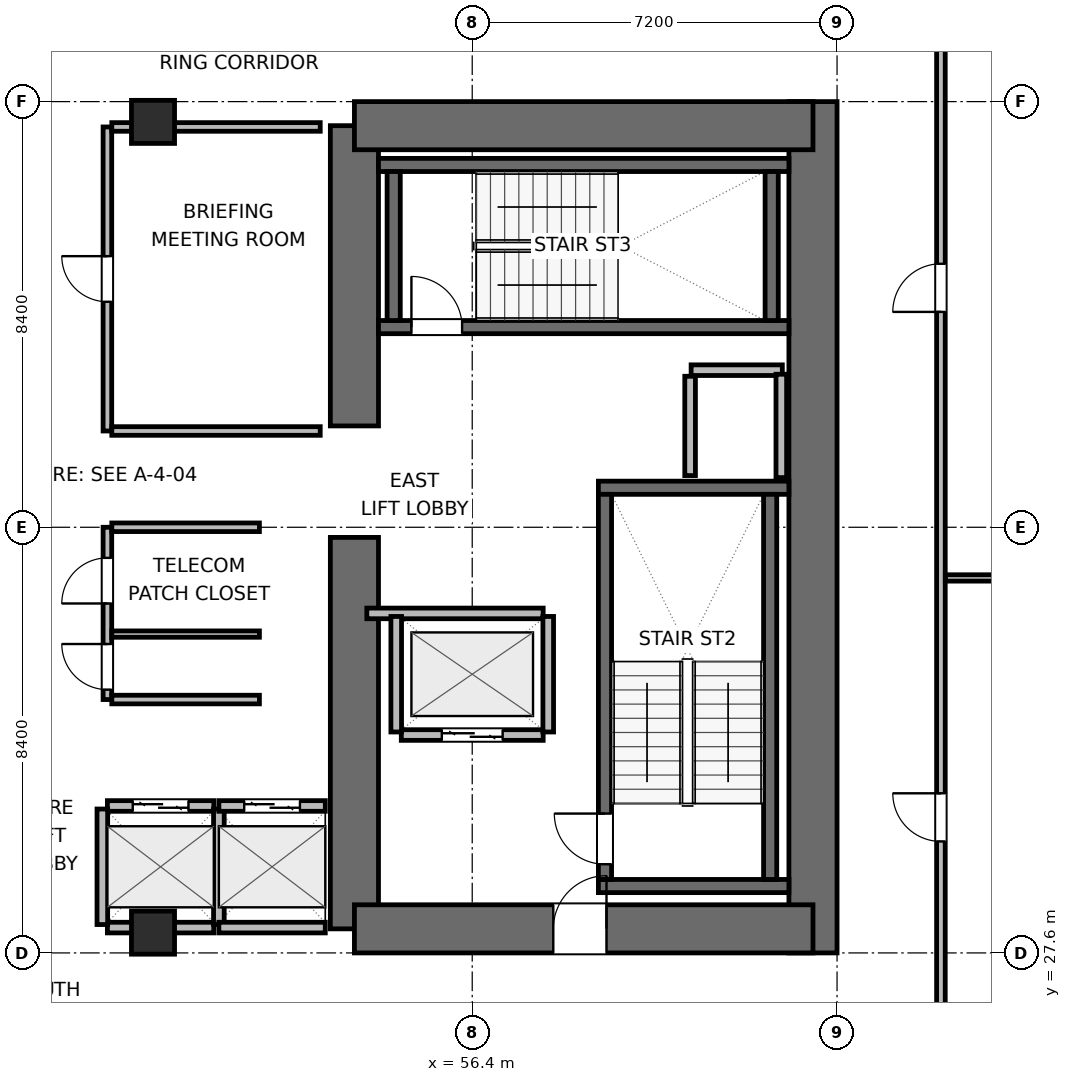
"""IFC4 building model, lengths in metres.
Left out: names, types, materials, properties, quantities, classifications, styles, units other than length and angle.
Written with IfcOpenShell. Run it as: python <this file> out.ifc"""

import sys

from ifc_helpers import new_model, si_unit, direction, frame, frame_2d, origin, origin_2d, place, context, subcontext, project, spatial, rectangle, extrude, element, fill, save


model = new_model("IFC4")
c1 = context("Model", 3, precision=1e-05, world=origin(), true_north=direction((0.0, 1.0)))
c2 = subcontext(c1, "Body", "Model", "MODEL_VIEW")
j1 = project(units=[si_unit("LENGTHUNIT", "METRE"), si_unit("PLANEANGLEUNIT", "RADIAN")], contexts=[c1])
p1 = place(None, origin())
s1 = spatial("IfcSite", under=j1, at=p1, CompositionType="ELEMENT")
p2 = place(p1, origin())
s2 = spatial("IfcBuilding", under=s1, at=p2, CompositionType="ELEMENT")
p3 = place(p2, frame((0.0, 0.0, 25.5)))
s3 = spatial("IfcBuildingStorey", under=s2, at=p3, CompositionType="ELEMENT", Elevation=25.5)
p4 = place(p3, frame((54.075, 28.075, 0.0), z_axis=(0.0, 0.0, 1.0), x_axis=(0.0, 1.0, 0.0)))
e1 = element("IfcWall", 1, at=p4, inside=s3, PredefinedType="SHEAR", context=c2, shape_type="SweptSolid", body=[
    extrude(rectangle(XDim=7.725, YDim=0.95, at=frame_2d((3.863, 0.0))), origin(), (0.0, 0.0, 1.0), 3.9),
])
p5 = place(p3, frame((54.075, 38.0, 0.0), z_axis=(0.0, 0.0, 1.0), x_axis=(0.0, 1.0, 0.0)))
e2 = element("IfcWall", 2, at=p5, inside=s3, PredefinedType="SHEAR", context=c2, shape_type="SweptSolid", body=[
    extrude(rectangle(XDim=5.925, YDim=0.95, at=frame_2d((2.962, 0.0))), origin(), (0.0, 0.0, 1.0), 3.9),
])
p6 = place(p3, frame((63.125, 27.6, 0.0), z_axis=(0.0, 0.0, 1.0), x_axis=(0.0, 1.0, 0.0)))
e3 = element("IfcWall", 3, at=p6, inside=s3, PredefinedType="SHEAR", context=c2, shape_type="SweptSolid", body=[
    extrude(rectangle(XDim=16.8, YDim=0.95, at=frame_2d((8.4, 0.0))), origin(), (0.0, 0.0, 1.0), 3.9),
])
p7 = place(p3, frame((54.075, 28.075, 0.0), z_axis=(0.0, 0.0, 1.0), x_axis=(1.0, 0.0, 0.0)))
e4 = element("IfcWall", 4, at=p7, inside=s3, PredefinedType="SHEAR", context=c2, shape_type="SweptSolid", body=[
    extrude(rectangle(XDim=9.05, YDim=0.95, at=frame_2d((4.525, 0.0))), origin(), (0.0, 0.0, 1.0), 3.9),
])
p8 = place(p7, frame((3.925, 0.0, 0.0)))
e5 = element("IfcOpeningElement", 5, at=p8, cuts=e4, PredefinedType="OPENING", context=c2, shape_type="SweptSolid", body=[
    extrude(rectangle(XDim=1.05, YDim=2.04, at=frame_2d((0.525, 1.02))), frame((0.0, 0.485, 0.0), z_axis=(0.0, -1.0, 0.0), x_axis=(1.0, 0.0, 0.0)), (0.0, 0.0, 1.0), 0.97),
])
p9 = place(p3, frame((54.075, 43.925, 0.0), z_axis=(0.0, 0.0, 1.0), x_axis=(1.0, 0.0, 0.0)))
e6 = element("IfcWall", 6, at=p9, inside=s3, PredefinedType="SHEAR", context=c2, shape_type="SweptSolid", body=[
    extrude(rectangle(XDim=9.05, YDim=0.95, at=frame_2d((4.525, 0.0))), origin(), (0.0, 0.0, 1.0), 3.9),
])
for number, where, z_axis, x_axis in (
    (7, (58.89, 28.92, 0.0), (0.0, 0.0, 1.0), (1.0, 0.0, 0.0)),
    (8, (58.89, 36.78, 0.0), (0.0, 0.0, 1.0), (1.0, 0.0, 0.0)),
):
    element("IfcWall", number, at=place(p3, frame(where, z_axis=z_axis, x_axis=x_axis)), inside=s3, PredefinedType="SHEAR", context=c2, shape_type="SweptSolid", body=[
        extrude(rectangle(XDim=3.76, YDim=0.26, at=frame_2d((1.88, 0.0))), origin(), (0.0, 0.0, 1.0), 3.9),
    ])
p10 = place(p3, frame((59.02, 29.05, 0.0), z_axis=(0.0, 0.0, 1.0), x_axis=(0.0, 1.0, 0.0)))
e9 = element("IfcWall", 9, at=p10, inside=s3, PredefinedType="SHEAR", context=c2, shape_type="SweptSolid", body=[
    extrude(rectangle(XDim=7.6, YDim=0.26, at=frame_2d((3.8, 0.0))), origin(), (0.0, 0.0, 1.0), 3.9),
])
p11 = place(p10, frame((0.3, 0.0, 0.0)))
e10 = element("IfcOpeningElement", 10, at=p11, cuts=e9, PredefinedType="OPENING", context=c2, shape_type="SweptSolid", body=[
    extrude(rectangle(XDim=1.0, YDim=2.04, at=frame_2d((0.5, 1.02))), frame((0.0, 0.14, 0.0), z_axis=(0.0, -1.0, 0.0), x_axis=(1.0, 0.0, 0.0)), (0.0, 0.0, 1.0), 0.28),
])
p12 = place(p3, frame((62.28, 29.05, 0.0), z_axis=(0.0, 0.0, 1.0), x_axis=(0.0, 1.0, 0.0)))
e11 = element("IfcWall", 11, at=p12, inside=s3, PredefinedType="SHEAR", context=c2, shape_type="SweptSolid", body=[
    extrude(rectangle(XDim=7.6, YDim=0.26, at=frame_2d((3.8, 0.0))), origin(), (0.0, 0.0, 1.0), 3.9),
])
p13 = place(p3, frame((54.55, 39.95, 0.0), z_axis=(0.0, 0.0, 1.0), x_axis=(1.0, 0.0, 0.0)))
e12 = element("IfcWall", 12, at=p13, inside=s3, PredefinedType="SHEAR", context=c2, shape_type="SweptSolid", body=[
    extrude(rectangle(XDim=8.1, YDim=0.26, at=frame_2d((4.05, 0.0))), origin(), (0.0, 0.0, 1.0), 3.9),
])
p14 = place(p13, frame((0.65, 0.0, 0.0)))
e13 = element("IfcOpeningElement", 13, at=p14, cuts=e12, PredefinedType="OPENING", context=c2, shape_type="SweptSolid", body=[
    extrude(rectangle(XDim=1.0, YDim=2.04, at=frame_2d((0.5, 1.02))), frame((0.0, 0.14, 0.0), z_axis=(0.0, -1.0, 0.0), x_axis=(1.0, 0.0, 0.0)), (0.0, 0.0, 1.0), 0.28),
])
p15 = place(p3, frame((54.55, 43.15, 0.0), z_axis=(0.0, 0.0, 1.0), x_axis=(1.0, 0.0, 0.0)))
e14 = element("IfcWall", 14, at=p15, inside=s3, PredefinedType="SHEAR", context=c2, shape_type="SweptSolid", body=[
    extrude(rectangle(XDim=8.1, YDim=0.26, at=frame_2d((4.05, 0.0))), origin(), (0.0, 0.0, 1.0), 3.9),
])
for number, where, z_axis, x_axis in (
    (15, (54.85, 40.08, 0.0), (0.0, 0.0, 1.0), (0.0, 1.0, 0.0)),
    (16, (62.31, 40.08, 0.0), (0.0, 0.0, 1.0), (0.0, 1.0, 0.0)),
):
    element("IfcWall", number, at=place(p3, frame(where, z_axis=z_axis, x_axis=x_axis)), inside=s3, PredefinedType="SHEAR", context=c2, shape_type="SweptSolid", body=[
        extrude(rectangle(XDim=2.94, YDim=0.26, at=frame_2d((1.47, 0.0))), origin(), (0.0, 0.0, 1.0), 3.9),
    ])
for number, where, z_axis, x_axis in (
    (17, (50.1, 28.0, 0.0), (0.0, 0.0, 1.0), (1.0, 0.0, 0.0)),
    (18, (50.1, 44.0, 0.0), (0.0, 0.0, 1.0), (1.0, 0.0, 0.0)),
):
    element("IfcColumn", number, at=place(p3, frame(where, z_axis=z_axis, x_axis=x_axis)), inside=s3, PredefinedType="COLUMN", context=c2, shape_type="SweptSolid", body=[
        extrude(rectangle(XDim=0.85, YDim=0.85, at=origin_2d()), origin(), (0.0, 0.0, 1.0), 3.9),
    ])
p16 = place(p3, frame((60.72, 39.1, 0.0), z_axis=(0.0, 0.0, 1.0), x_axis=(1.0, 0.0, 0.0)))
e19 = element("IfcWall", 19, at=p16, inside=s3, PredefinedType="PARTITIONING", context=c2, shape_type="SweptSolid", body=[
    extrude(rectangle(XDim=1.8, YDim=0.21, at=frame_2d((0.9, 0.0))), origin(), (0.0, 0.0, 1.0), 3.64),
])
p17 = place(p3, frame((60.7, 37.02, 0.0), z_axis=(0.0, 0.0, 1.0), x_axis=(0.0, 1.0, 0.0)))
e20 = element("IfcWall", 20, at=p17, inside=s3, PredefinedType="PARTITIONING", context=c2, shape_type="SweptSolid", body=[
    extrude(rectangle(XDim=1.96, YDim=0.21, at=frame_2d((0.98, 0.0))), origin(), (0.0, 0.0, 1.0), 3.64),
])
p18 = place(p3, frame((62.5, 36.98, 0.0), z_axis=(0.0, 0.0, 1.0), x_axis=(0.0, 1.0, 0.0)))
e21 = element("IfcWall", 21, at=p18, inside=s3, PredefinedType="PARTITIONING", context=c2, shape_type="SweptSolid", body=[
    extrude(rectangle(XDim=2.04, YDim=0.21, at=frame_2d((1.02, 0.0))), origin(), (0.0, 0.0, 1.0), 3.64),
])
p19 = place(p3, frame((55.0, 31.9, 0.0), z_axis=(0.0, 0.0, 1.0), x_axis=(1.0, 0.0, 0.0)))
e22 = element("IfcWall", 22, at=p19, inside=s3, PredefinedType="PARTITIONING", context=c2, shape_type="SweptSolid", body=[
    extrude(rectangle(XDim=2.8, YDim=0.21, at=frame_2d((1.4, 0.0))), origin(), (0.0, 0.0, 1.0), 3.64),
])
p20 = place(p19, frame((0.8, 0.0, 0.0)))
e23 = element("IfcOpeningElement", 23, at=p20, cuts=e22, PredefinedType="OPENING", context=c2, shape_type="SweptSolid", body=[
    extrude(rectangle(XDim=1.2, YDim=2.04, at=frame_2d((0.6, 1.02))), frame((0.0, 0.115, 0.0), z_axis=(0.0, -1.0, 0.0), x_axis=(1.0, 0.0, 0.0)), (0.0, 0.0, 1.0), 0.23),
])
p21 = place(p3, frame((54.32, 34.3, 0.0), z_axis=(0.0, 0.0, 1.0), x_axis=(1.0, 0.0, 0.0)))
e24 = element("IfcWall", 24, at=p21, inside=s3, PredefinedType="PARTITIONING", context=c2, shape_type="SweptSolid", body=[
    extrude(rectangle(XDim=3.48, YDim=0.21, at=frame_2d((1.74, 0.0))), origin(), (0.0, 0.0, 1.0), 3.64),
])
for number, where, z_axis, x_axis in (
    (25, (54.9, 31.96, 0.0), (0.0, 0.0, 1.0), (0.0, 1.0, 0.0)),
    (26, (57.9, 31.96, 0.0), (0.0, 0.0, 1.0), (0.0, 1.0, 0.0)),
):
    element("IfcWall", number, at=place(p3, frame(where, z_axis=z_axis, x_axis=x_axis)), inside=s3, PredefinedType="PARTITIONING", context=c2, shape_type="SweptSolid", body=[
        extrude(rectangle(XDim=2.28, YDim=0.21, at=frame_2d((1.14, 0.0))), origin(), (0.0, 0.0, 1.0), 3.64),
    ])
p22 = place(p3, frame((49.2, 30.5, 0.0), z_axis=(0.0, 0.0, 1.0), x_axis=(1.0, 0.0, 0.0)))
e27 = element("IfcWall", 27, at=p22, inside=s3, PredefinedType="PARTITIONING", context=c2, shape_type="SweptSolid", body=[
    extrude(rectangle(XDim=2.1, YDim=0.21, at=frame_2d((1.05, 0.0))), origin(), (0.0, 0.0, 1.0), 3.64),
])
p23 = place(p22, frame((0.5, 0.0, 0.0)))
e28 = element("IfcOpeningElement", 28, at=p23, cuts=e27, PredefinedType="OPENING", context=c2, shape_type="SweptSolid", body=[
    extrude(rectangle(XDim=1.1, YDim=2.04, at=frame_2d((0.55, 1.02))), frame((0.0, 0.115, 0.0), z_axis=(0.0, -1.0, 0.0), x_axis=(1.0, 0.0, 0.0)), (0.0, 0.0, 1.0), 0.23),
])
p24 = place(p3, frame((49.2, 28.1, 0.0), z_axis=(0.0, 0.0, 1.0), x_axis=(1.0, 0.0, 0.0)))
e29 = element("IfcWall", 29, at=p24, inside=s3, PredefinedType="PARTITIONING", context=c2, shape_type="SweptSolid", body=[
    extrude(rectangle(XDim=2.1, YDim=0.21, at=frame_2d((1.05, 0.0))), origin(), (0.0, 0.0, 1.0), 2.525),
])
for number, where, z_axis, x_axis in (
    (30, (49.1, 28.16, 0.0), (0.0, 0.0, 1.0), (0.0, 1.0, 0.0)),
    (31, (51.4, 28.16, 0.0), (0.0, 0.0, 1.0), (0.0, 1.0, 0.0)),
):
    element("IfcWall", number, at=place(p3, frame(where, z_axis=z_axis, x_axis=x_axis)), inside=s3, PredefinedType="PARTITIONING", context=c2, shape_type="SweptSolid", body=[
        extrude(rectangle(XDim=2.28, YDim=0.21, at=frame_2d((1.14, 0.0))), origin(), (0.0, 0.0, 1.0), 3.64),
    ])
p25 = place(p3, frame((51.4, 30.5, 0.0), z_axis=(0.0, 0.0, 1.0), x_axis=(1.0, 0.0, 0.0)))
e32 = element("IfcWall", 32, at=p25, inside=s3, PredefinedType="PARTITIONING", context=c2, shape_type="SweptSolid", body=[
    extrude(rectangle(XDim=2.1, YDim=0.21, at=frame_2d((1.05, 0.0))), origin(), (0.0, 0.0, 1.0), 3.64),
])
p26 = place(p25, frame((0.5, 0.0, 0.0)))
e33 = element("IfcOpeningElement", 33, at=p26, cuts=e32, PredefinedType="OPENING", context=c2, shape_type="SweptSolid", body=[
    extrude(rectangle(XDim=1.1, YDim=2.04, at=frame_2d((0.55, 1.02))), frame((0.0, 0.115, 0.0), z_axis=(0.0, -1.0, 0.0), x_axis=(1.0, 0.0, 0.0)), (0.0, 0.0, 1.0), 0.23),
])
p27 = place(p3, frame((51.4, 28.1, 0.0), z_axis=(0.0, 0.0, 1.0), x_axis=(1.0, 0.0, 0.0)))
e34 = element("IfcWall", 34, at=p27, inside=s3, PredefinedType="PARTITIONING", context=c2, shape_type="SweptSolid", body=[
    extrude(rectangle(XDim=2.1, YDim=0.21, at=frame_2d((1.05, 0.0))), origin(), (0.0, 0.0, 1.0), 2.525),
])
p28 = place(p3, frame((49.2, 32.6, 0.0), z_axis=(0.0, 0.0, 1.0), x_axis=(0.0, 1.0, 0.0)))
e35 = element("IfcWall", 35, at=p28, inside=s3, PredefinedType="PARTITIONING", context=c2, shape_type="SweptSolid", body=[
    extrude(rectangle(XDim=3.4, YDim=0.17, at=frame_2d((1.7, 0.0))), origin(), (0.0, 0.0, 1.0), 3.64),
])
p29 = place(p28, frame((0.196, 0.0, 0.0)))
e36 = element("IfcOpeningElement", 36, at=p29, cuts=e35, PredefinedType="OPENING", context=c2, shape_type="SweptSolid", body=[
    extrude(rectangle(XDim=0.9, YDim=2.02, at=frame_2d((0.45, 1.01))), frame((0.0, 0.095, 0.0), z_axis=(0.0, -1.0, 0.0), x_axis=(1.0, 0.0, 0.0)), (0.0, 0.0, 1.0), 0.19),
])
p30 = place(p28, frame((1.896, 0.0, 0.0)))
e37 = element("IfcOpeningElement", 37, at=p30, cuts=e35, PredefinedType="OPENING", context=c2, shape_type="SweptSolid", body=[
    extrude(rectangle(XDim=0.9, YDim=2.02, at=frame_2d((0.45, 1.01))), frame((0.0, 0.095, 0.0), z_axis=(0.0, -1.0, 0.0), x_axis=(1.0, 0.0, 0.0)), (0.0, 0.0, 1.0), 0.19),
])
for number, where, z_axis, x_axis in (
    (38, (49.287, 32.6, 0.0), (0.0, 0.0, 1.0), (1.0, 0.0, 0.0)),
    (39, (49.287, 36.0, 0.0), (0.0, 0.0, 1.0), (1.0, 0.0, 0.0)),
):
    element("IfcWall", number, at=place(p3, frame(where, z_axis=z_axis, x_axis=x_axis)), inside=s3, PredefinedType="PARTITIONING", context=c2, shape_type="SweptSolid", body=[
        extrude(rectangle(XDim=2.913, YDim=0.17, at=frame_2d((1.457, 0.0))), origin(), (0.0, 0.0, 1.0), 3.64),
    ])
p31 = place(p3, frame((49.287, 33.892, 0.0), z_axis=(0.0, 0.0, 1.0), x_axis=(1.0, 0.0, 0.0)))
e40 = element("IfcWall", 40, at=p31, inside=s3, PredefinedType="PARTITIONING", context=c2, shape_type="SweptSolid", body=[
    extrude(rectangle(XDim=2.913, YDim=0.125, at=frame_2d((1.457, 0.0))), origin(), (0.0, 0.0, 1.0), 3.64),
])
p32 = place(p3, frame((49.2, 37.9, 0.0), z_axis=(0.0, 0.0, 1.0), x_axis=(0.0, 1.0, 0.0)))
e41 = element("IfcWall", 41, at=p32, inside=s3, PredefinedType="PARTITIONING", context=c2, shape_type="SweptSolid", body=[
    extrude(rectangle(XDim=6.0, YDim=0.17, at=frame_2d((3.0, 0.0))), origin(), (0.0, 0.0, 1.0), 3.64),
])
p33 = place(p32, frame((2.55, 0.0, 0.0)))
e42 = element("IfcOpeningElement", 42, at=p33, cuts=e41, PredefinedType="OPENING", context=c2, shape_type="SweptSolid", body=[
    extrude(rectangle(XDim=0.9, YDim=2.02, at=frame_2d((0.45, 1.01))), frame((0.0, 0.095, 0.0), z_axis=(0.0, -1.0, 0.0), x_axis=(1.0, 0.0, 0.0)), (0.0, 0.0, 1.0), 0.19),
])
p34 = place(p3, frame((49.287, 37.9, 0.0), z_axis=(0.0, 0.0, 1.0), x_axis=(1.0, 0.0, 0.0)))
e43 = element("IfcWall", 43, at=p34, inside=s3, PredefinedType="PARTITIONING", context=c2, shape_type="SweptSolid", body=[
    extrude(rectangle(XDim=4.113, YDim=0.17, at=frame_2d((2.056, 0.0))), origin(), (0.0, 0.0, 1.0), 3.64),
])
p35 = place(p3, frame((49.287, 43.9, 0.0), z_axis=(0.0, 0.0, 1.0), x_axis=(1.0, 0.0, 0.0)))
e44 = element("IfcWall", 44, at=p35, inside=s3, PredefinedType="PARTITIONING", context=c2, shape_type="SweptSolid", body=[
    extrude(rectangle(XDim=4.113, YDim=0.17, at=frame_2d((2.056, 0.0))), origin(), (0.0, 0.0, 1.0), 2.525),
])
p36 = place(p3, frame((65.65, 25.637, 0.0), z_axis=(0.0, 0.0, 1.0), x_axis=(0.0, 1.0, 0.0)))
e45 = element("IfcWall", 45, at=p36, inside=s3, PredefinedType="PARTITIONING", context=c2, shape_type="SweptSolid", body=[
    extrude(rectangle(XDim=20.726, YDim=0.17, at=frame_2d((10.363, 0.0))), origin(), (0.0, 0.0, 1.0), 3.64),
])
p37 = place(p36, frame((4.163, 0.0, 0.0)))
e46 = element("IfcOpeningElement", 46, at=p37, cuts=e45, PredefinedType="OPENING", context=c2, shape_type="SweptSolid", body=[
    extrude(rectangle(XDim=0.95, YDim=2.04, at=frame_2d((0.475, 1.02))), frame((0.0, 0.095, 0.0), z_axis=(0.0, -1.0, 0.0), x_axis=(1.0, 0.0, 0.0)), (0.0, 0.0, 1.0), 0.19),
])
p38 = place(p36, frame((14.613, 0.0, 0.0)))
e47 = element("IfcOpeningElement", 47, at=p38, cuts=e45, PredefinedType="OPENING", context=c2, shape_type="SweptSolid", body=[
    extrude(rectangle(XDim=0.95, YDim=2.04, at=frame_2d((0.475, 1.02))), frame((0.0, 0.095, 0.0), z_axis=(0.0, -1.0, 0.0), x_axis=(1.0, 0.0, 0.0)), (0.0, 0.0, 1.0), 0.19),
])
p39 = place(p3, frame((65.737, 35.0, 0.0), z_axis=(0.0, 0.0, 1.0), x_axis=(1.0, 0.0, 0.0)))
e48 = element("IfcWall", 48, at=p39, inside=s3, PredefinedType="PARTITIONING", context=c2, shape_type="SweptSolid", body=[
    extrude(rectangle(XDim=13.218, YDim=0.125, at=frame_2d((6.609, 0.0))), origin(), (0.0, 0.0, 1.0), 3.64),
])
p40 = place(p11, origin())
e49 = element("IfcDoor", 49, at=p40, inside=s3, OperationType="SINGLE_SWING_RIGHT", PredefinedType="DOOR", context=c2, shape_type="SweptSolid", body=[
    extrude(rectangle(XDim=1.0, YDim=2.04, at=frame_2d((0.5, 1.02))), frame((0.0, 0.025, 0.0), z_axis=(0.0, -1.0, 0.0), x_axis=(1.0, 0.0, 0.0)), (0.0, 0.0, 1.0), 0.05),
])
fill(e10, e49)
p41 = place(p14, origin())
e50 = element("IfcDoor", 50, at=p41, inside=s3, OperationType="SINGLE_SWING_LEFT", PredefinedType="DOOR", context=c2, shape_type="SweptSolid", body=[
    extrude(rectangle(XDim=1.0, YDim=2.04, at=frame_2d((0.5, 1.02))), frame((0.0, 0.025, 0.0), z_axis=(0.0, -1.0, 0.0), x_axis=(1.0, 0.0, 0.0)), (0.0, 0.0, 1.0), 0.05),
])
fill(e13, e50)
p42 = place(p20, origin())
e51 = element("IfcDoor", 51, at=p42, inside=s3, OperationType="DOUBLE_DOOR_SLIDING", PredefinedType="DOOR", context=c2, shape_type="SweptSolid", body=[
    extrude(rectangle(XDim=1.2, YDim=2.04, at=frame_2d((0.6, 1.02))), frame((0.0, 0.025, 0.0), z_axis=(0.0, -1.0, 0.0), x_axis=(1.0, 0.0, 0.0)), (0.0, 0.0, 1.0), 0.05),
])
fill(e23, e51)
p43 = place(p23, origin())
e52 = element("IfcDoor", 52, at=p43, inside=s3, OperationType="DOUBLE_DOOR_SLIDING", PredefinedType="DOOR", context=c2, shape_type="SweptSolid", body=[
    extrude(rectangle(XDim=1.1, YDim=2.04, at=frame_2d((0.55, 1.02))), frame((0.0, 0.025, 0.0), z_axis=(0.0, -1.0, 0.0), x_axis=(1.0, 0.0, 0.0)), (0.0, 0.0, 1.0), 0.05),
])
fill(e28, e52)
p44 = place(p26, origin())
e53 = element("IfcDoor", 53, at=p44, inside=s3, OperationType="DOUBLE_DOOR_SLIDING", PredefinedType="DOOR", context=c2, shape_type="SweptSolid", body=[
    extrude(rectangle(XDim=1.1, YDim=2.04, at=frame_2d((0.55, 1.02))), frame((0.0, 0.025, 0.0), z_axis=(0.0, -1.0, 0.0), x_axis=(1.0, 0.0, 0.0)), (0.0, 0.0, 1.0), 0.05),
])
fill(e33, e53)
p45 = place(p8, origin())
e54 = element("IfcDoor", 54, at=p45, inside=s3, OperationType="SINGLE_SWING_RIGHT", PredefinedType="DOOR", context=c2, shape_type="SweptSolid", body=[
    extrude(rectangle(XDim=1.05, YDim=2.04, at=frame_2d((0.525, 1.02))), frame((0.0, 0.025, 0.0), z_axis=(0.0, -1.0, 0.0), x_axis=(1.0, 0.0, 0.0)), (0.0, 0.0, 1.0), 0.05),
])
fill(e5, e54)
p46 = place(p29, origin())
e55 = element("IfcDoor", 55, at=p46, inside=s3, OperationType="SINGLE_SWING_RIGHT", PredefinedType="DOOR", context=c2, shape_type="SweptSolid", body=[
    extrude(rectangle(XDim=0.9, YDim=2.02, at=frame_2d((0.45, 1.01))), frame((0.0, 0.025, 0.0), z_axis=(0.0, -1.0, 0.0), x_axis=(1.0, 0.0, 0.0)), (0.0, 0.0, 1.0), 0.05),
])
fill(e36, e55)
p47 = place(p30, origin())
e56 = element("IfcDoor", 56, at=p47, inside=s3, OperationType="SINGLE_SWING_LEFT", PredefinedType="DOOR", context=c2, shape_type="SweptSolid", body=[
    extrude(rectangle(XDim=0.9, YDim=2.02, at=frame_2d((0.45, 1.01))), frame((0.0, 0.025, 0.0), z_axis=(0.0, -1.0, 0.0), x_axis=(1.0, 0.0, 0.0)), (0.0, 0.0, 1.0), 0.05),
])
fill(e37, e56)
p48 = place(p33, origin())
e57 = element("IfcDoor", 57, at=p48, inside=s3, OperationType="SINGLE_SWING_RIGHT", PredefinedType="DOOR", context=c2, shape_type="SweptSolid", body=[
    extrude(rectangle(XDim=0.9, YDim=2.02, at=frame_2d((0.45, 1.01))), frame((0.0, 0.025, 0.0), z_axis=(0.0, -1.0, 0.0), x_axis=(1.0, 0.0, 0.0)), (0.0, 0.0, 1.0), 0.05),
])
fill(e42, e57)
p49 = place(p37, origin())
e58 = element("IfcDoor", 58, at=p49, inside=s3, OperationType="SINGLE_SWING_RIGHT", PredefinedType="DOOR", context=c2, shape_type="SweptSolid", body=[
    extrude(rectangle(XDim=0.95, YDim=2.04, at=frame_2d((0.475, 1.02))), frame((0.0, 0.025, 0.0), z_axis=(0.0, -1.0, 0.0), x_axis=(1.0, 0.0, 0.0)), (0.0, 0.0, 1.0), 0.05),
])
fill(e46, e58)
p50 = place(p38, origin())
e59 = element("IfcDoor", 59, at=p50, inside=s3, OperationType="SINGLE_SWING_LEFT", PredefinedType="DOOR", context=c2, shape_type="SweptSolid", body=[
    extrude(rectangle(XDim=0.95, YDim=2.04, at=frame_2d((0.475, 1.02))), frame((0.0, 0.025, 0.0), z_axis=(0.0, -1.0, 0.0), x_axis=(1.0, 0.0, 0.0)), (0.0, 0.0, 1.0), 0.05),
])
fill(e47, e59)
save(model, sys.argv[1])
